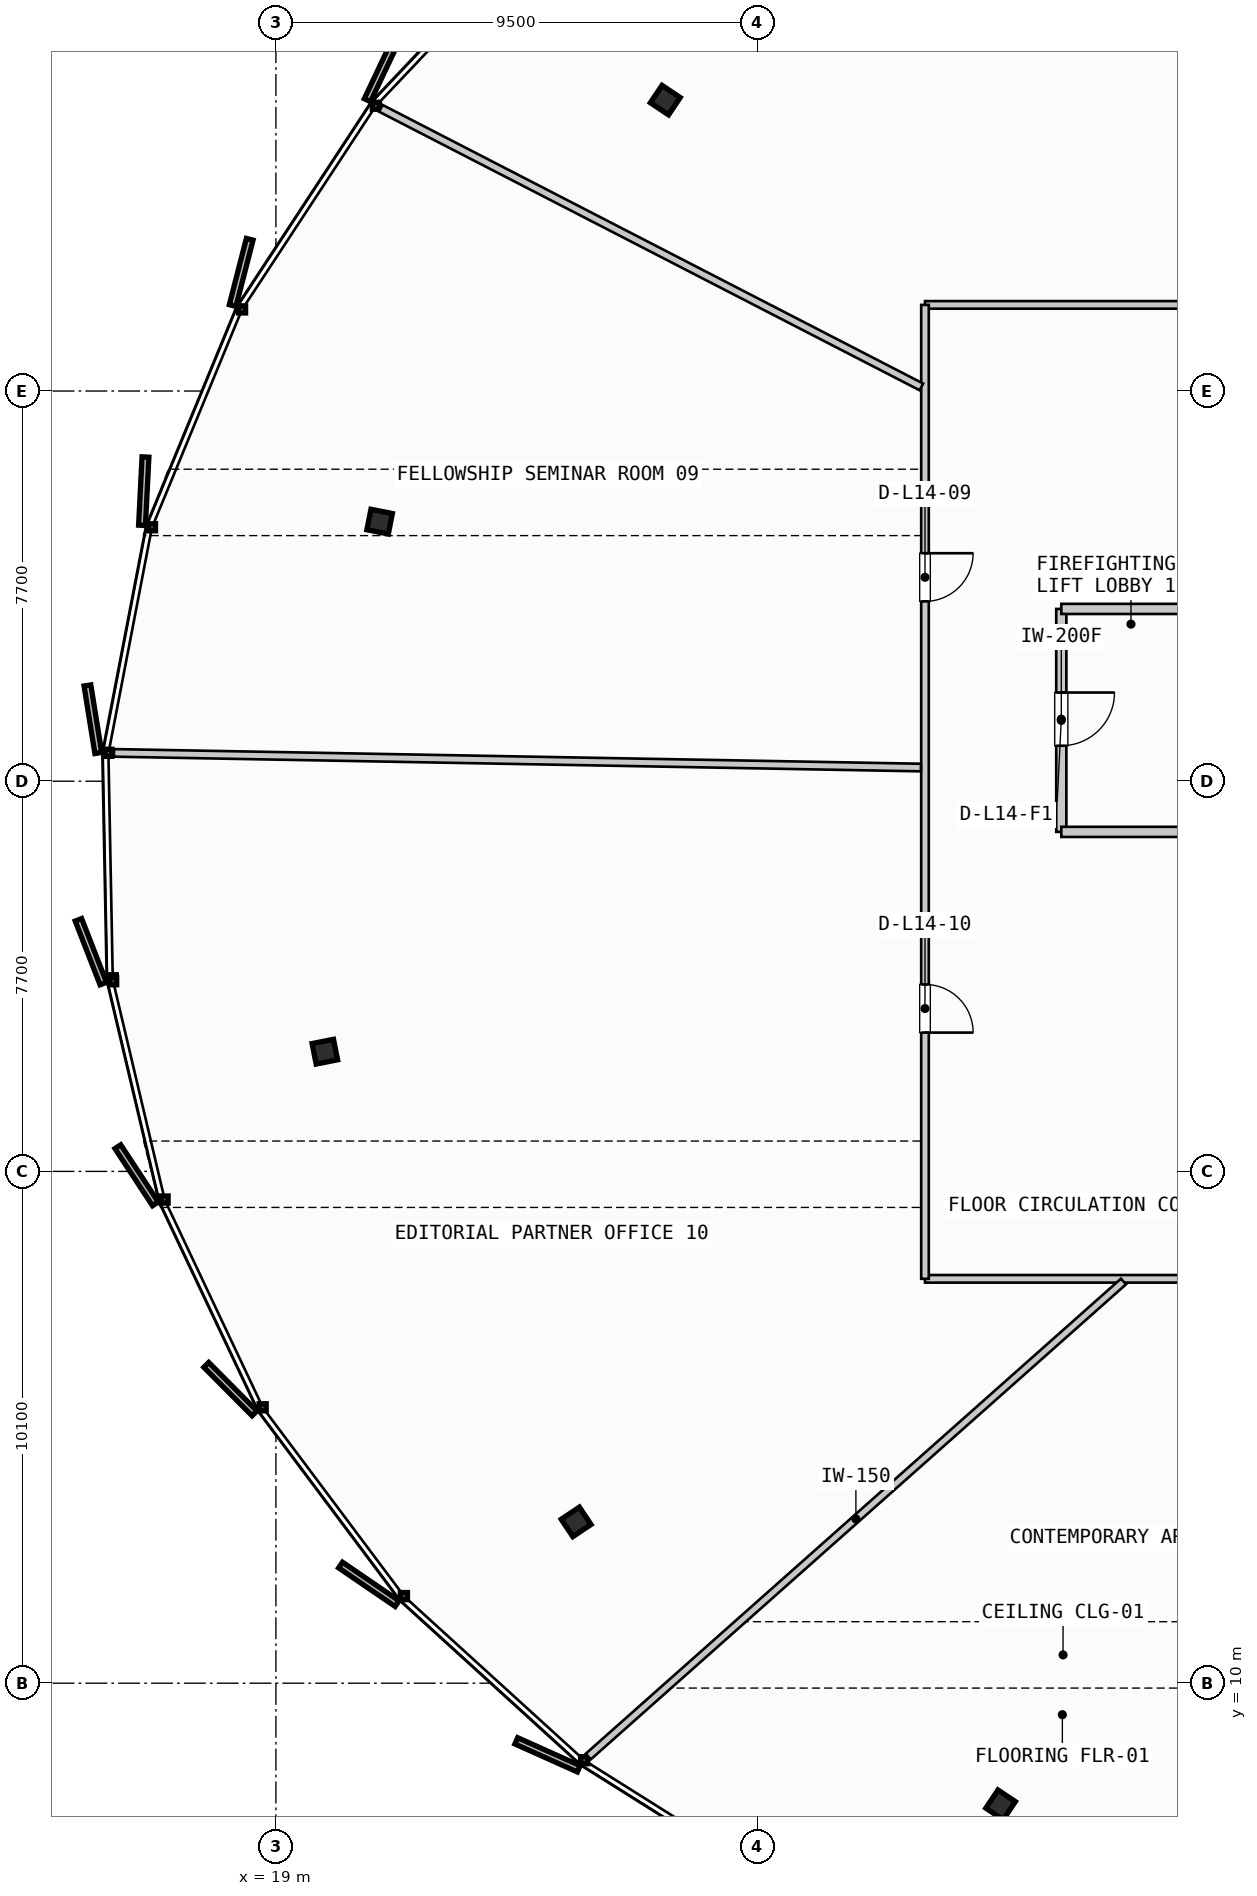
"""IFC4 building model, lengths in metres.
Left out: names, types, materials, properties, quantities, classifications, styles, units other than length and angle.
Written with IfcOpenShell. Run it as: python <this file> out.ifc"""

import sys

from ifc_helpers import new_model, si_unit, direction, frame, frame_2d, origin, origin_2d, place, context, subcontext, project, spatial, rectangle, i_section, extrude, source, transform, mapped, element, fill, save


model = new_model("IFC4")
c1 = context("Model", 3, precision=1e-05, world=origin(), true_north=direction((0.0, 1.0)))
c2 = subcontext(c1, "Body", "Model", "MODEL_VIEW")
j1 = project(units=[si_unit("LENGTHUNIT", "METRE"), si_unit("PLANEANGLEUNIT", "RADIAN")], contexts=[c1])
p1 = place(None, origin())
s1 = spatial("IfcSite", under=j1, at=p1, CompositionType="ELEMENT")
p2 = place(p1, origin())
s2 = spatial("IfcBuilding", under=s1, at=p2, CompositionType="ELEMENT")
p3 = place(p2, frame((0.0, 0.0, 60.0)))
s3 = spatial("IfcBuildingStorey", under=s2, at=p3, CompositionType="ELEMENT", Elevation=60.0)
m1 = source(origin(), c2, "Body", "SweptSolid", [
    extrude(i_section(OverallWidth=0.412, OverallDepth=0.431, WebThickness=0.042, FlangeThickness=0.068, FilletRadius=0.015, at=origin_2d()), origin(), (0.0, 0.0, 1.0), 3.55),
])
for number, where, z_axis, x_axis in (
    (1, (26.685, 41.241, 0.0), (0.0, 0.0, 1.0), (-0.831, 0.556, 0.0)),
    (2, (21.047, 32.923, 0.0), (0.0, 0.0, 1.0), (-0.981, 0.195, 0.0)),
    (3, (19.966, 22.462, 0.0), (0.0, 0.0, 1.0), (-0.981, -0.195, 0.0)),
    (4, (24.925, 13.183, 0.0), (0.0, 0.0, 1.0), (-0.831, -0.556, 0.0)),
    (5, (33.302, 7.599, 0.0), (0.0, 0.0, 1.0), (-0.556, -0.831, 0.0)),
):
    element("IfcColumn", number, at=place(p3, frame(where, z_axis=z_axis, x_axis=x_axis)), inside=s3, PredefinedType="COLUMN", context=c2, shape_type="MappedRepresentation", body=[
        mapped(m1, transform((0.0, 0.0, 0.0), scale=1.0)),
    ])
p4 = place(p3, frame((34.5, 31.2, 0.0), z_axis=(0.0, 0.0, 1.0), x_axis=(0.0, -1.0, 0.0)))
e6 = element("IfcWall", 6, at=p4, inside=s3, PredefinedType="PARTITIONING", context=c2, shape_type="SweptSolid", body=[
    extrude(rectangle(XDim=4.4, YDim=0.2, at=frame_2d((2.2, 0.0))), origin(), (0.0, 0.0, 1.0), 2.645),
])
p5 = place(p4, frame((1.65, 0.0, 0.0)))
e7 = element("IfcOpeningElement", 7, at=p5, cuts=e6, PredefinedType="OPENING", context=c2, shape_type="SweptSolid", body=[
    extrude(rectangle(XDim=1.05, YDim=2.15, at=frame_2d((0.525, 1.075))), frame((0.0, 0.11, 0.0), z_axis=(0.0, -1.0, 0.0), x_axis=(1.0, 0.0, 0.0)), (0.0, 0.0, 1.0), 0.22),
])
for number, where, z_axis, x_axis in (
    (8, (34.5, 26.8, 0.0), (0.0, 0.0, 1.0), (1.0, 0.0, 0.0)),
    (9, (34.5, 31.2, 0.0), (0.0, 0.0, 1.0), (1.0, 0.0, 0.0)),
):
    element("IfcWall", number, at=place(p3, frame(where, z_axis=z_axis, x_axis=x_axis)), inside=s3, PredefinedType="PARTITIONING", context=c2, shape_type="SweptSolid", body=[
        extrude(rectangle(XDim=3.14, YDim=0.2, at=frame_2d((1.57, 0.0))), origin(), (0.0, 0.0, 1.0), 2.645),
    ])
p6 = place(p3, frame((31.81, 17.98, 0.0), z_axis=(0.0, 0.0, 1.0), x_axis=(1.0, 0.0, 0.0)))
e10 = element("IfcWall", 10, at=p6, inside=s3, PredefinedType="PARTITIONING", context=c2, shape_type="SweptSolid", body=[
    extrude(rectangle(XDim=29.98, YDim=0.15, at=frame_2d((14.99, 0.0))), origin(), (0.0, 0.0, 1.0), 2.645),
])
p7 = place(p6, frame((7.461, 0.0, 0.0)))
e11 = element("IfcOpeningElement", 11, at=p7, cuts=e10, PredefinedType="OPENING", context=c2, shape_type="SweptSolid", body=[
    extrude(rectangle(XDim=0.95, YDim=2.15, at=frame_2d((0.475, 1.075))), frame((0.0, 0.085, 0.0), z_axis=(0.0, -1.0, 0.0), x_axis=(1.0, 0.0, 0.0)), (0.0, 0.0, 1.0), 0.17),
])
p8 = place(p6, frame((19.927, 0.0, 0.0)))
e12 = element("IfcOpeningElement", 12, at=p8, cuts=e10, PredefinedType="OPENING", context=c2, shape_type="SweptSolid", body=[
    extrude(rectangle(XDim=0.95, YDim=2.15, at=frame_2d((0.475, 1.075))), frame((0.0, 0.085, 0.0), z_axis=(0.0, -1.0, 0.0), x_axis=(1.0, 0.0, 0.0)), (0.0, 0.0, 1.0), 0.17),
])
p9 = place(p3, frame((61.79, 37.2, 0.0), z_axis=(0.0, 0.0, 1.0), x_axis=(-1.0, 0.0, 0.0)))
e13 = element("IfcWall", 13, at=p9, inside=s3, PredefinedType="PARTITIONING", context=c2, shape_type="SweptSolid", body=[
    extrude(rectangle(XDim=29.98, YDim=0.15, at=frame_2d((14.99, 0.0))), origin(), (0.0, 0.0, 1.0), 2.645),
])
p10 = place(p9, frame((5.862, 0.0, 0.0)))
e14 = element("IfcOpeningElement", 14, at=p10, cuts=e13, PredefinedType="OPENING", context=c2, shape_type="SweptSolid", body=[
    extrude(rectangle(XDim=0.95, YDim=2.15, at=frame_2d((0.475, 1.075))), frame((0.0, 0.085, 0.0), z_axis=(0.0, -1.0, 0.0), x_axis=(1.0, 0.0, 0.0)), (0.0, 0.0, 1.0), 0.17),
])
p11 = place(p9, frame((14.719, 0.0, 0.0)))
e15 = element("IfcOpeningElement", 15, at=p11, cuts=e13, PredefinedType="OPENING", context=c2, shape_type="SweptSolid", body=[
    extrude(rectangle(XDim=0.95, YDim=2.15, at=frame_2d((0.475, 1.075))), frame((0.0, 0.085, 0.0), z_axis=(0.0, -1.0, 0.0), x_axis=(1.0, 0.0, 0.0)), (0.0, 0.0, 1.0), 0.17),
])
p12 = place(p9, frame((23.37, 0.0, 0.0)))
e16 = element("IfcOpeningElement", 16, at=p12, cuts=e13, PredefinedType="OPENING", context=c2, shape_type="SweptSolid", body=[
    extrude(rectangle(XDim=0.95, YDim=2.15, at=frame_2d((0.475, 1.075))), frame((0.0, 0.085, 0.0), z_axis=(0.0, -1.0, 0.0), x_axis=(1.0, 0.0, 0.0)), (0.0, 0.0, 1.0), 0.17),
])
p13 = place(p3, frame((31.81, 37.2, 0.0), z_axis=(0.0, 0.0, 1.0), x_axis=(0.0, -1.0, 0.0)))
e17 = element("IfcWall", 17, at=p13, inside=s3, PredefinedType="PARTITIONING", context=c2, shape_type="SweptSolid", body=[
    extrude(rectangle(XDim=19.22, YDim=0.15, at=frame_2d((9.61, 0.0))), origin(), (0.0, 0.0, 1.0), 2.645),
])
p14 = place(p13, frame((4.901, 0.0, 0.0)))
e18 = element("IfcOpeningElement", 18, at=p14, cuts=e17, PredefinedType="OPENING", context=c2, shape_type="SweptSolid", body=[
    extrude(rectangle(XDim=0.95, YDim=2.15, at=frame_2d((0.475, 1.075))), frame((0.0, 0.085, 0.0), z_axis=(0.0, -1.0, 0.0), x_axis=(1.0, 0.0, 0.0)), (0.0, 0.0, 1.0), 0.17),
])
p15 = place(p13, frame((13.411, 0.0, 0.0)))
e19 = element("IfcOpeningElement", 19, at=p15, cuts=e17, PredefinedType="OPENING", context=c2, shape_type="SweptSolid", body=[
    extrude(rectangle(XDim=0.95, YDim=2.15, at=frame_2d((0.475, 1.075))), frame((0.0, 0.085, 0.0), z_axis=(0.0, -1.0, 0.0), x_axis=(1.0, 0.0, 0.0)), (0.0, 0.0, 1.0), 0.17),
])
p16 = place(p3, frame((35.727, 17.927, 0.0), z_axis=(0.0, 0.0, 1.0), x_axis=(-0.747915570014, -0.663793868706, 0.0)))
e20 = element("IfcWall", 20, at=p16, inside=s3, PredefinedType="PARTITIONING", context=c2, shape_type="SweptSolid", body=[
    extrude(rectangle(XDim=14.122, YDim=0.15, at=frame_2d((7.061, 0.0))), origin(), (0.0, 0.0, 1.0), 2.645),
])
p17 = place(p3, frame((31.739, 35.581, 0.0), z_axis=(0.0, 0.0, 1.0), x_axis=(-0.888912808973, 0.458076432535, 0.0)))
e21 = element("IfcWall", 21, at=p17, inside=s3, PredefinedType="PARTITIONING", context=c2, shape_type="SweptSolid", body=[
    extrude(rectangle(XDim=12.001, YDim=0.15, at=frame_2d((6.0, 0.0))), origin(), (0.0, 0.0, 1.0), 2.645),
])
p18 = place(p3, frame((31.73, 28.07, 0.0), z_axis=(0.0, 0.0, 1.0), x_axis=(-0.999835040305, 0.018162934185, 0.0)))
e22 = element("IfcWall", 22, at=p18, inside=s3, PredefinedType="PARTITIONING", context=c2, shape_type="SweptSolid", body=[
    extrude(rectangle(XDim=15.928, YDim=0.15, at=frame_2d((7.964, 0.0))), origin(), (0.0, 0.0, 1.0), 2.645),
])
m2 = source(origin(), c2, "Body", "SweptSolid", [
    extrude(rectangle(XDim=1.05, YDim=2.15, at=frame_2d((0.525, 1.075))), frame((0.0, 0.025, 0.0), z_axis=(0.0, -1.0, 0.0), x_axis=(1.0, 0.0, 0.0)), (0.0, 0.0, 1.0), 0.05),
])
p19 = place(p5, origin())
e23 = element("IfcDoor", 23, at=p19, inside=s3, OperationType="SINGLE_SWING_LEFT", PredefinedType="DOOR", context=c2, shape_type="MappedRepresentation", body=[
    mapped(m2, transform((0.0, 0.0, 0.0), scale=1.0)),
])
fill(e7, e23)
m3 = source(origin(), c2, "Body", "SweptSolid", [
    extrude(rectangle(XDim=0.95, YDim=2.15, at=frame_2d((0.475, 1.075))), frame((0.0, 0.025, 0.0), z_axis=(0.0, -1.0, 0.0), x_axis=(1.0, 0.0, 0.0)), (0.0, 0.0, 1.0), 0.05),
])
p20 = place(p14, origin())
e24 = element("IfcDoor", 24, at=p20, inside=s3, OperationType="SINGLE_SWING_LEFT", PredefinedType="DOOR", context=c2, shape_type="MappedRepresentation", body=[
    mapped(m3, transform((0.0, 0.0, 0.0), scale=1.0)),
])
fill(e18, e24)
p21 = place(p15, origin())
e25 = element("IfcDoor", 25, at=p21, inside=s3, OperationType="SINGLE_SWING_RIGHT", PredefinedType="DOOR", context=c2, shape_type="MappedRepresentation", body=[
    mapped(m3, transform((0.0, 0.0, 0.0), scale=1.0)),
])
fill(e19, e25)
save(model, sys.argv[1])
